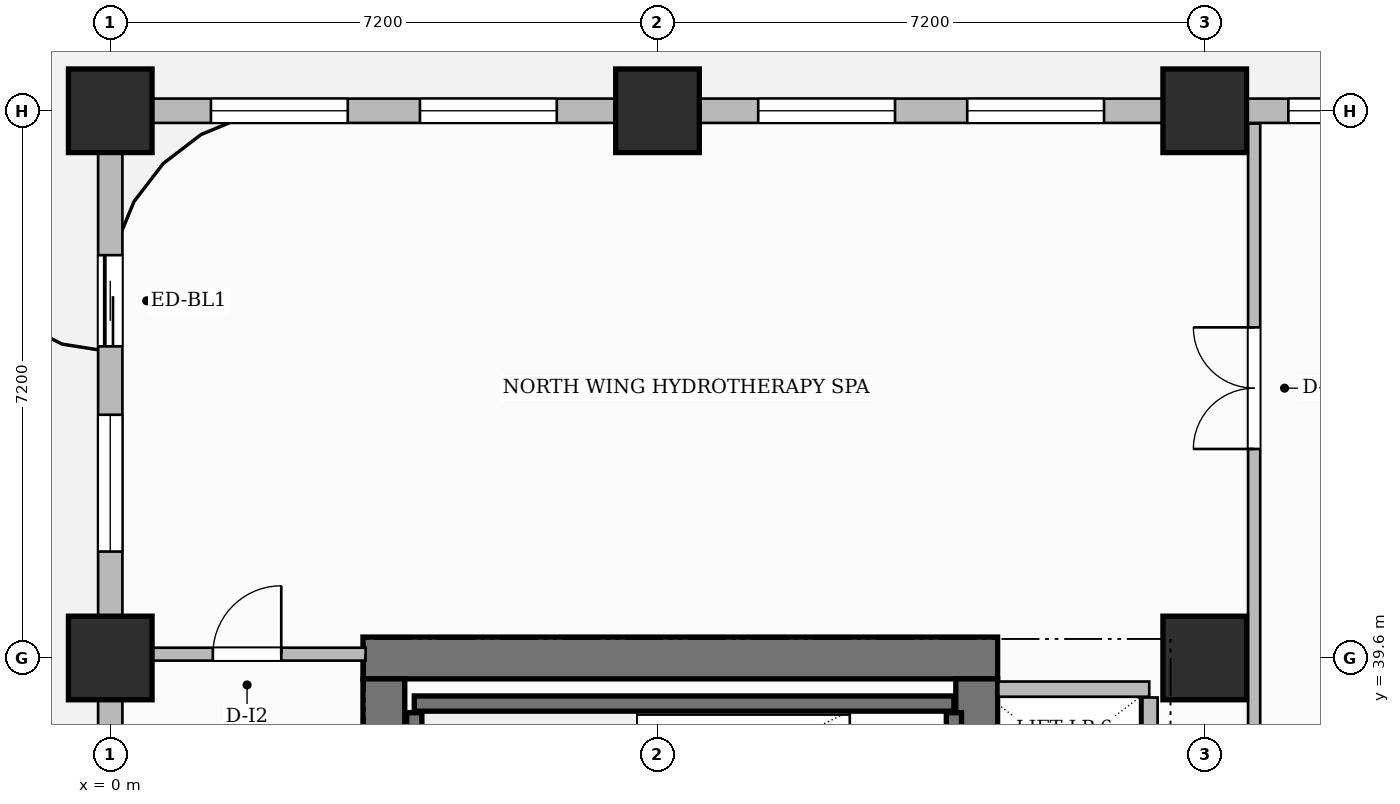
"""IFC4 building model, lengths in metres.
Left out: names, types, materials, properties, quantities, classifications, styles, units other than length and angle.
Written with IfcOpenShell. Run it as: python <this file> out.ifc"""

import sys

from ifc_helpers import new_model, si_unit, direction, frame, frame_2d, origin, origin_2d, place, context, subcontext, project, spatial, rectangle, extrude, source, transform, mapped, element, fill, save


model = new_model("IFC4")
c1 = context("Model", 3, precision=1e-05, world=origin(), true_north=direction((0.0, 1.0)))
c2 = subcontext(c1, "Body", "Model", "MODEL_VIEW")
j1 = project(units=[si_unit("LENGTHUNIT", "METRE"), si_unit("PLANEANGLEUNIT", "RADIAN")], contexts=[c1])
p1 = place(None, origin())
s1 = spatial("IfcSite", under=j1, at=p1, CompositionType="ELEMENT")
p2 = place(p1, origin())
s2 = spatial("IfcBuilding", under=s1, at=p2, CompositionType="ELEMENT")
p3 = place(p2, frame((0.0, 0.0, 99.0)))
s3 = spatial("IfcBuildingStorey", under=s2, at=p3, CompositionType="ELEMENT", Elevation=99.0)
p4 = place(p3, frame((3.325, 39.6, 0.0), z_axis=(0.0, 0.0, 1.0), x_axis=(1.0, 0.0, 0.0)))
e1 = element("IfcWall", 1, at=p4, inside=s3, PredefinedType="SHEAR", context=c2, shape_type="SweptSolid", body=[
    extrude(rectangle(XDim=8.35, YDim=0.55, at=frame_2d((4.175, 0.0))), origin(), (0.0, 0.0, 1.0), 3.7),
])
p5 = place(p3, frame((3.6, 25.475, 0.0), z_axis=(0.0, 0.0, 1.0), x_axis=(0.0, 1.0, 0.0)))
e2 = element("IfcWall", 2, at=p5, inside=s3, PredefinedType="SHEAR", context=c2, shape_type="SweptSolid", body=[
    extrude(rectangle(XDim=13.85, YDim=0.55, at=frame_2d((6.925, 0.0))), origin(), (0.0, 0.0, 1.0), 3.7),
])
p6 = place(p3, frame((11.4, 25.475, 0.0), z_axis=(0.0, 0.0, 1.0), x_axis=(0.0, 1.0, 0.0)))
e3 = element("IfcWall", 3, at=p6, inside=s3, PredefinedType="SHEAR", context=c2, shape_type="SweptSolid", body=[
    extrude(rectangle(XDim=13.85, YDim=0.55, at=frame_2d((6.925, 0.0))), origin(), (0.0, 0.0, 1.0), 3.7),
])
p7 = place(p6, frame((6.495, 0.0, 0.0)))
e4 = element("IfcOpeningElement", 4, at=p7, cuts=e3, PredefinedType="OPENING", context=c2, shape_type="SweptSolid", body=[
    extrude(rectangle(XDim=1.5, YDim=2.2, at=frame_2d((0.75, 1.1))), frame((0.0, 0.285, 0.0), z_axis=(0.0, -1.0, 0.0), x_axis=(1.0, 0.0, 0.0)), (0.0, 0.0, 1.0), 0.57),
])
m1 = source(origin(), c2, "Body", "SweptSolid", [
    extrude(rectangle(XDim=1.1, YDim=1.1, at=origin_2d()), origin(), (0.0, 0.0, 1.0), 3.7),
])
for number, where, z_axis, x_axis in (
    (5, (0.0, 39.6, 0.0), (0.0, 0.0, 1.0), (1.0, 0.0, 0.0)),
    (6, (0.0, 46.8, 0.0), (0.0, 0.0, 1.0), (1.0, 0.0, 0.0)),
    (7, (7.2, 46.8, 0.0), (0.0, 0.0, 1.0), (1.0, 0.0, 0.0)),
    (8, (14.4, 39.6, 0.0), (0.0, 0.0, 1.0), (1.0, 0.0, 0.0)),
    (9, (14.4, 46.8, 0.0), (0.0, 0.0, 1.0), (1.0, 0.0, 0.0)),
):
    element("IfcColumn", number, at=place(p3, frame(where, z_axis=z_axis, x_axis=x_axis)), inside=s3, PredefinedType="COLUMN", context=c2, shape_type="MappedRepresentation", body=[
        mapped(m1, transform((0.0, 0.0, 0.0), scale=1.0)),
    ])
p8 = place(p3, frame((4.0, 39.0, 0.0), z_axis=(0.0, 0.0, 1.0), x_axis=(1.0, 0.0, 0.0)))
e10 = element("IfcWall", 10, at=p8, inside=s3, PredefinedType="SHEAR", context=c2, shape_type="SweptSolid", body=[
    extrude(rectangle(XDim=7.1, YDim=0.2, at=frame_2d((3.55, 0.0))), origin(), (0.0, 0.0, 1.0), 3.7),
])
for number, where, z_axis, x_axis in (
    (11, (4.0, 36.18, 0.0), (0.0, 0.0, 1.0), (0.0, 1.0, 0.0)),
    (12, (11.1, 36.18, 0.0), (0.0, 0.0, 1.0), (0.0, 1.0, 0.0)),
):
    element("IfcWall", number, at=place(p3, frame(where, z_axis=z_axis, x_axis=x_axis)), inside=s3, PredefinedType="SHEAR", context=c2, shape_type="SweptSolid", body=[
        extrude(rectangle(XDim=2.7, YDim=0.2, at=frame_2d((1.35, 0.0))), origin(), (0.0, 0.0, 1.0), 3.7),
    ])
p9 = place(p3, frame((11.685, 39.19, 0.0), z_axis=(0.0, 0.0, 1.0), x_axis=(1.0, 0.0, 0.0)))
e13 = element("IfcWall", 13, at=p9, inside=s3, PredefinedType="PARTITIONING", context=c2, shape_type="SweptSolid", body=[
    extrude(rectangle(XDim=1.985, YDim=0.2, at=frame_2d((0.992, 0.0))), origin(), (0.0, 0.0, 1.0), 3.45),
])
p10 = place(p3, frame((13.68, 34.36, 0.0), z_axis=(0.0, 0.0, 1.0), x_axis=(0.0, 1.0, 0.0)))
e14 = element("IfcWall", 14, at=p10, inside=s3, PredefinedType="PARTITIONING", context=c2, shape_type="SweptSolid", body=[
    extrude(rectangle(XDim=4.72, YDim=0.2, at=frame_2d((2.36, 0.0))), origin(), (0.0, 0.0, 1.0), 3.45),
])
p11 = place(p3, frame((0.24, 39.65, 0.0), z_axis=(0.0, 0.0, 1.0), x_axis=(1.0, 0.0, 0.0)))
e15 = element("IfcWall", 15, at=p11, inside=s3, PredefinedType="PARTITIONING", context=c2, shape_type="SweptSolid", body=[
    extrude(rectangle(XDim=3.12, YDim=0.17, at=frame_2d((1.56, 0.0))), origin(), (0.0, 0.0, 1.0), 3.45),
])
p12 = place(p11, frame((1.11, 0.0, 0.0)))
e16 = element("IfcOpeningElement", 16, at=p12, cuts=e15, PredefinedType="OPENING", context=c2, shape_type="SweptSolid", body=[
    extrude(rectangle(XDim=0.9, YDim=2.15, at=frame_2d((0.45, 1.075))), frame((0.0, 0.095, 0.0), z_axis=(0.0, -1.0, 0.0), x_axis=(1.0, 0.0, 0.0)), (0.0, 0.0, 1.0), 0.19),
])
p13 = place(p3, frame((15.05, 34.34, 0.0), z_axis=(0.0, 0.0, 1.0), x_axis=(0.0, 1.0, 0.0)))
e17 = element("IfcWall", 17, at=p13, inside=s3, PredefinedType="PARTITIONING", context=c2, shape_type="SweptSolid", body=[
    extrude(rectangle(XDim=12.292, YDim=0.16, at=frame_2d((6.146, 0.0))), origin(), (0.0, 0.0, 1.0), 3.45),
])
p14 = place(p13, frame((8.01, 0.0, 0.0)))
e18 = element("IfcOpeningElement", 18, at=p14, cuts=e17, PredefinedType="OPENING", context=c2, shape_type="SweptSolid", body=[
    extrude(rectangle(XDim=1.6, YDim=2.4, at=frame_2d((0.8, 1.2))), frame((0.0, 0.09, 0.0), z_axis=(0.0, -1.0, 0.0), x_axis=(1.0, 0.0, 0.0)), (0.0, 0.0, 1.0), 0.18),
])
p15 = place(p3, frame((0.0, 25.25, 0.0), z_axis=(0.0, 0.0, 1.0), x_axis=(0.0, 1.0, 0.0)))
e19 = element("IfcWall", 19, at=p15, inside=s3, PredefinedType="SOLIDWALL", context=c2, shape_type="SweptSolid", body=[
    extrude(rectangle(XDim=21.5, YDim=0.32, at=frame_2d((10.75, 0.0))), origin(), (0.0, 0.0, 1.0), 2.885),
])
p16 = place(p15, frame((18.45, 0.0, 0.0)))
e20 = element("IfcOpeningElement", 20, at=p16, cuts=e19, PredefinedType="OPENING", context=c2, shape_type="SweptSolid", body=[
    extrude(rectangle(XDim=1.2, YDim=2.2, at=frame_2d((0.6, 1.1))), frame((0.0, 0.17, 0.0), z_axis=(0.0, -1.0, 0.0), x_axis=(1.0, 0.0, 0.0)), (0.0, 0.0, 1.0), 0.34),
])
p17 = place(p15, frame((0.8, 0.0, 0.0)))
e21 = element("IfcOpeningElement", 21, at=p17, cuts=e19, PredefinedType="OPENING", context=c2, shape_type="SweptSolid", body=[
    extrude(rectangle(XDim=1.2, YDim=2.2, at=frame_2d((0.6, 1.1))), frame((0.0, 0.17, 0.0), z_axis=(0.0, -1.0, 0.0), x_axis=(1.0, 0.0, 0.0)), (0.0, 0.0, 1.0), 0.34),
])
p18 = place(p15, frame((3.425, 0.0, 0.8)))
e22 = element("IfcOpeningElement", 22, at=p18, cuts=e19, PredefinedType="OPENING", context=c2, shape_type="SweptSolid", body=[
    extrude(rectangle(XDim=1.8, YDim=1.85, at=frame_2d((0.9, 0.925))), frame((0.0, 0.17, 0.0), z_axis=(0.0, -1.0, 0.0), x_axis=(1.0, 0.0, 0.0)), (0.0, 0.0, 1.0), 0.34),
])
p19 = place(p15, frame((8.475, 0.0, 0.8)))
e23 = element("IfcOpeningElement", 23, at=p19, cuts=e19, PredefinedType="OPENING", context=c2, shape_type="SweptSolid", body=[
    extrude(rectangle(XDim=1.8, YDim=1.85, at=frame_2d((0.9, 0.925))), frame((0.0, 0.17, 0.0), z_axis=(0.0, -1.0, 0.0), x_axis=(1.0, 0.0, 0.0)), (0.0, 0.0, 1.0), 0.34),
])
p20 = place(p15, frame((11.225, 0.0, 0.8)))
e24 = element("IfcOpeningElement", 24, at=p20, cuts=e19, PredefinedType="OPENING", context=c2, shape_type="SweptSolid", body=[
    extrude(rectangle(XDim=1.8, YDim=1.85, at=frame_2d((0.9, 0.925))), frame((0.0, 0.17, 0.0), z_axis=(0.0, -1.0, 0.0), x_axis=(1.0, 0.0, 0.0)), (0.0, 0.0, 1.0), 0.34),
])
p21 = place(p15, frame((15.75, 0.0, 0.8)))
e25 = element("IfcOpeningElement", 25, at=p21, cuts=e19, PredefinedType="OPENING", context=c2, shape_type="SweptSolid", body=[
    extrude(rectangle(XDim=1.8, YDim=1.85, at=frame_2d((0.9, 0.925))), frame((0.0, 0.17, 0.0), z_axis=(0.0, -1.0, 0.0), x_axis=(1.0, 0.0, 0.0)), (0.0, 0.0, 1.0), 0.34),
])
p22 = place(p3, frame((0.0, 46.8, 0.0), z_axis=(0.0, 0.0, 1.0), x_axis=(1.0, 0.0, 0.0)))
e26 = element("IfcWall", 26, at=p22, inside=s3, PredefinedType="SOLIDWALL", context=c2, shape_type="SweptSolid", body=[
    extrude(rectangle(XDim=18.0, YDim=0.32, at=frame_2d((9.0, 0.0))), origin(), (0.0, 0.0, 1.0), 2.885),
])
p23 = place(p22, frame((1.325, 0.0, 0.8)))
e27 = element("IfcOpeningElement", 27, at=p23, cuts=e26, PredefinedType="OPENING", context=c2, shape_type="SweptSolid", body=[
    extrude(rectangle(XDim=1.8, YDim=1.85, at=frame_2d((0.9, 0.925))), frame((0.0, 0.17, 0.0), z_axis=(0.0, -1.0, 0.0), x_axis=(1.0, 0.0, 0.0)), (0.0, 0.0, 1.0), 0.34),
])
p24 = place(p22, frame((4.075, 0.0, 0.8)))
e28 = element("IfcOpeningElement", 28, at=p24, cuts=e26, PredefinedType="OPENING", context=c2, shape_type="SweptSolid", body=[
    extrude(rectangle(XDim=1.8, YDim=1.85, at=frame_2d((0.9, 0.925))), frame((0.0, 0.17, 0.0), z_axis=(0.0, -1.0, 0.0), x_axis=(1.0, 0.0, 0.0)), (0.0, 0.0, 1.0), 0.34),
])
p25 = place(p22, frame((8.525, 0.0, 0.8)))
e29 = element("IfcOpeningElement", 29, at=p25, cuts=e26, PredefinedType="OPENING", context=c2, shape_type="SweptSolid", body=[
    extrude(rectangle(XDim=1.8, YDim=1.85, at=frame_2d((0.9, 0.925))), frame((0.0, 0.17, 0.0), z_axis=(0.0, -1.0, 0.0), x_axis=(1.0, 0.0, 0.0)), (0.0, 0.0, 1.0), 0.34),
])
p26 = place(p22, frame((11.275, 0.0, 0.8)))
e30 = element("IfcOpeningElement", 30, at=p26, cuts=e26, PredefinedType="OPENING", context=c2, shape_type="SweptSolid", body=[
    extrude(rectangle(XDim=1.8, YDim=1.85, at=frame_2d((0.9, 0.925))), frame((0.0, 0.17, 0.0), z_axis=(0.0, -1.0, 0.0), x_axis=(1.0, 0.0, 0.0)), (0.0, 0.0, 1.0), 0.34),
])
p27 = place(p22, frame((15.5, 0.0, 0.8)))
e31 = element("IfcOpeningElement", 31, at=p27, cuts=e26, PredefinedType="OPENING", context=c2, shape_type="SweptSolid", body=[
    extrude(rectangle(XDim=1.4, YDim=1.85, at=frame_2d((0.7, 0.925))), frame((0.0, 0.17, 0.0), z_axis=(0.0, -1.0, 0.0), x_axis=(1.0, 0.0, 0.0)), (0.0, 0.0, 1.0), 0.34),
])
m2 = source(origin(), c2, "Body", "SweptSolid", [
    extrude(rectangle(XDim=0.9, YDim=2.15, at=frame_2d((0.45, 1.075))), frame((0.0, 0.025, 0.0), z_axis=(0.0, -1.0, 0.0), x_axis=(1.0, 0.0, 0.0)), (0.0, 0.0, 1.0), 0.05),
])
p28 = place(p12, origin())
e32 = element("IfcDoor", 32, at=p28, inside=s3, OperationType="SINGLE_SWING_RIGHT", PredefinedType="DOOR", context=c2, shape_type="MappedRepresentation", body=[
    mapped(m2, transform((0.0, 0.0, 0.0), scale=1.0)),
])
fill(e16, e32)
m3 = source(origin(), c2, "Body", "SweptSolid", [
    extrude(rectangle(XDim=1.6, YDim=2.4, at=frame_2d((0.8, 1.2))), frame((0.0, 0.025, 0.0), z_axis=(0.0, -1.0, 0.0), x_axis=(1.0, 0.0, 0.0)), (0.0, 0.0, 1.0), 0.05),
])
p29 = place(p14, origin())
e33 = element("IfcDoor", 33, at=p29, inside=s3, OperationType="DOUBLE_DOOR_SINGLE_SWING", PredefinedType="DOOR", context=c2, shape_type="MappedRepresentation", body=[
    mapped(m3, transform((0.0, 0.0, 0.0), scale=1.0)),
])
fill(e18, e33)
m4 = source(origin(), c2, "Body", "SweptSolid", [
    extrude(rectangle(XDim=1.2, YDim=2.2, at=frame_2d((0.6, 1.1))), frame((0.0, 0.025, 0.0), z_axis=(0.0, -1.0, 0.0), x_axis=(1.0, 0.0, 0.0)), (0.0, 0.0, 1.0), 0.05),
])
p30 = place(p16, origin())
e34 = element("IfcDoor", 34, at=p30, inside=s3, OperationType="SLIDING_TO_LEFT", PredefinedType="DOOR", context=c2, shape_type="MappedRepresentation", body=[
    mapped(m4, transform((0.0, 0.0, 0.0), scale=1.0)),
])
fill(e20, e34)
m5 = source(origin(), c2, "Body", "SweptSolid", [
    extrude(rectangle(XDim=1.8, YDim=1.85, at=frame_2d((0.9, 0.925))), frame((0.0, 0.03, 0.0), z_axis=(0.0, -1.0, 0.0), x_axis=(1.0, 0.0, 0.0)), (0.0, 0.0, 1.0), 0.06),
])
p31 = place(p21, origin())
e35 = element("IfcWindow", 35, at=p31, inside=s3, PartitioningType="DOUBLE_PANEL_VERTICAL", PredefinedType="WINDOW", context=c2, shape_type="MappedRepresentation", body=[
    mapped(m5, transform((0.0, 0.0, 0.0), scale=1.0)),
])
fill(e25, e35)
p32 = place(p23, origin())
e36 = element("IfcWindow", 36, at=p32, inside=s3, PartitioningType="DOUBLE_PANEL_VERTICAL", PredefinedType="WINDOW", context=c2, shape_type="MappedRepresentation", body=[
    mapped(m5, transform((0.0, 0.0, 0.0), scale=1.0)),
])
fill(e27, e36)
p33 = place(p24, origin())
e37 = element("IfcWindow", 37, at=p33, inside=s3, PartitioningType="DOUBLE_PANEL_VERTICAL", PredefinedType="WINDOW", context=c2, shape_type="MappedRepresentation", body=[
    mapped(m5, transform((0.0, 0.0, 0.0), scale=1.0)),
])
fill(e28, e37)
p34 = place(p25, origin())
e38 = element("IfcWindow", 38, at=p34, inside=s3, PartitioningType="DOUBLE_PANEL_VERTICAL", PredefinedType="WINDOW", context=c2, shape_type="MappedRepresentation", body=[
    mapped(m5, transform((0.0, 0.0, 0.0), scale=1.0)),
])
fill(e29, e38)
p35 = place(p26, origin())
e39 = element("IfcWindow", 39, at=p35, inside=s3, PartitioningType="DOUBLE_PANEL_VERTICAL", PredefinedType="WINDOW", context=c2, shape_type="MappedRepresentation", body=[
    mapped(m5, transform((0.0, 0.0, 0.0), scale=1.0)),
])
fill(e30, e39)
m6 = source(origin(), c2, "Body", "SweptSolid", [
    extrude(rectangle(XDim=1.4, YDim=1.85, at=frame_2d((0.7, 0.925))), frame((0.0, 0.03, 0.0), z_axis=(0.0, -1.0, 0.0), x_axis=(1.0, 0.0, 0.0)), (0.0, 0.0, 1.0), 0.06),
])
p36 = place(p27, origin())
e40 = element("IfcWindow", 40, at=p36, inside=s3, PartitioningType="SINGLE_PANEL", PredefinedType="WINDOW", context=c2, shape_type="MappedRepresentation", body=[
    mapped(m6, transform((0.0, 0.0, 0.0), scale=1.0)),
])
fill(e31, e40)
save(model, sys.argv[1])
